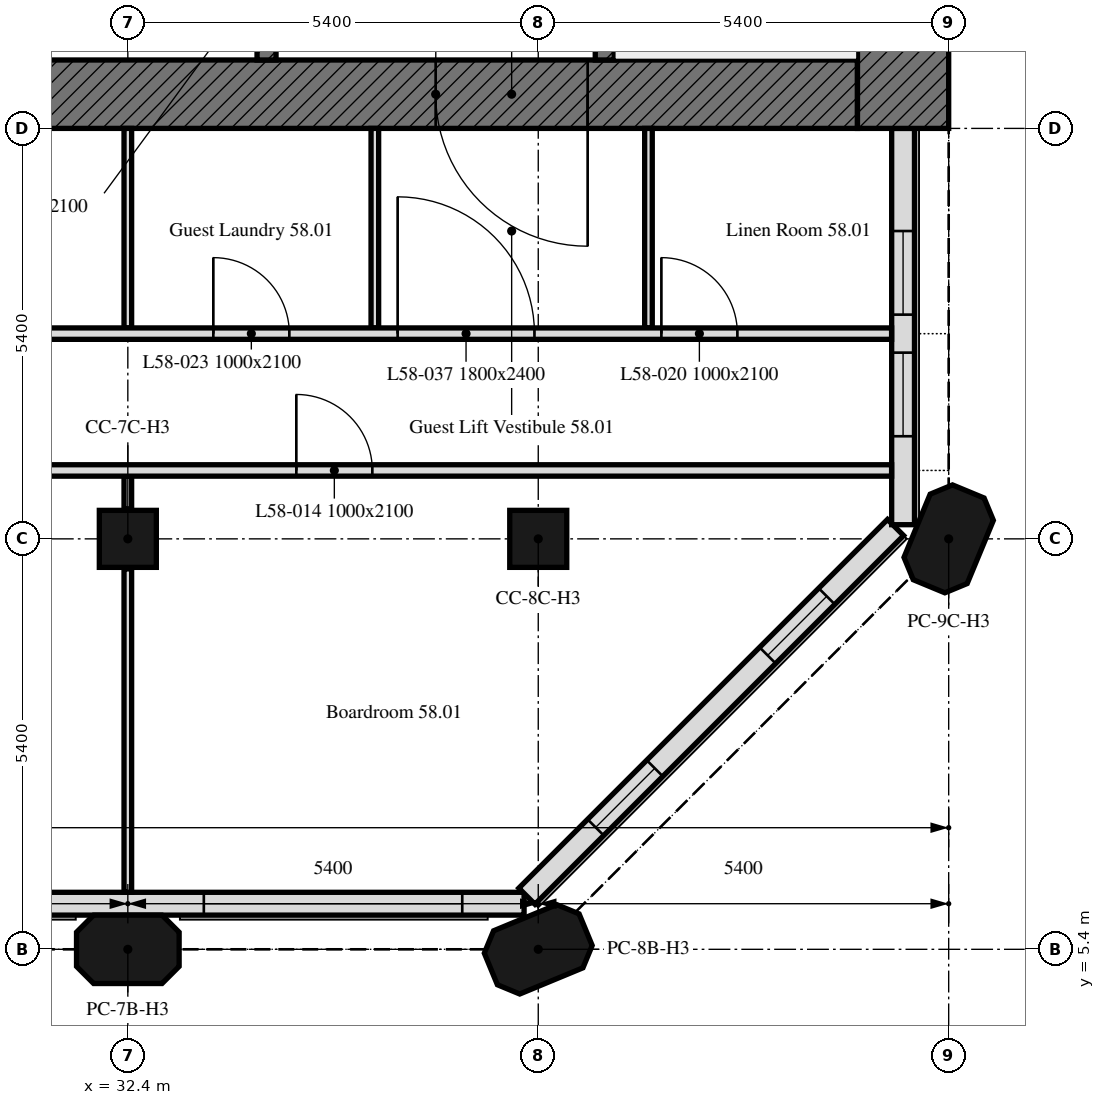
"""IFC4 building model, lengths in metres.
Left out: names, types, materials, properties, quantities, classifications, styles, units other than length and angle.
Written with IfcOpenShell. Run it as: python <this file> out.ifc"""

import sys

from ifc_helpers import new_model, si_unit, direction, frame, frame_2d, origin, origin_2d, place, context, subcontext, project, spatial, polyline, rectangle, outline, extrude, element, fill, save


model = new_model("IFC4")
c1 = context("Model", 3, precision=1e-05, world=origin(), true_north=direction((0.0, 1.0)))
c2 = subcontext(c1, "Body", "Model", "MODEL_VIEW")
j1 = project(units=[si_unit("LENGTHUNIT", "METRE"), si_unit("PLANEANGLEUNIT", "RADIAN")], contexts=[c1])
p1 = place(None, origin())
s1 = spatial("IfcSite", under=j1, at=p1, CompositionType="ELEMENT")
p2 = place(p1, origin())
s2 = spatial("IfcBuilding", under=s1, at=p2, CompositionType="ELEMENT")
p3 = place(p2, frame((0.0, 0.0, 230.2)))
s3 = spatial("IfcBuildingStorey", under=s2, at=p3, CompositionType="ELEMENT", Elevation=230.2)
for number, where, z_axis, x_axis in (
    (1, (32.4, 5.4, 0.0), (0.0, 0.0, 1.0), (1.0, 0.0, 0.0)),
    (2, (37.8, 5.4, 0.0), (0.0, 0.0, 1.0), (0.924, 0.383, 0.0)),
):
    element("IfcColumn", number, at=place(p3, frame(where, z_axis=z_axis, x_axis=x_axis)), inside=s3, PredefinedType="COLUMN", context=c2, shape_type="SweptSolid", body=[
        extrude(outline(polyline([(-0.45, -0.45), (0.45, -0.45), (0.675, -0.225), (0.675, 0.225), (0.45, 0.45), (-0.45, 0.45), (-0.675, 0.225), (-0.675, -0.225), (-0.45, -0.45)])), origin(), (0.0, 0.0, 1.0), 2.8),
    ])
for number, where, z_axis, x_axis in (
    (3, (32.4, 10.8, 0.0), (0.0, 0.0, 1.0), (1.0, 0.0, 0.0)),
    (4, (37.8, 10.8, 0.0), (0.0, 0.0, 1.0), (1.0, 0.0, 0.0)),
):
    element("IfcColumn", number, at=place(p3, frame(where, z_axis=z_axis, x_axis=x_axis)), inside=s3, PredefinedType="COLUMN", context=c2, shape_type="SweptSolid", body=[
        extrude(rectangle(XDim=0.75, YDim=0.75, at=origin_2d()), origin(), (0.0, 0.0, 1.0), 2.8),
    ])
p4 = place(p3, frame((43.2, 10.8, 0.0), z_axis=(0.0, 0.0, 1.0), x_axis=(0.382683432365, 0.923879532511, 0.0)))
e5 = element("IfcColumn", 5, at=p4, inside=s3, PredefinedType="COLUMN", context=c2, shape_type="SweptSolid", body=[
    extrude(outline(polyline([(-0.45, -0.45), (0.45, -0.45), (0.675, -0.225), (0.675, 0.225), (0.45, 0.45), (-0.45, 0.45), (-0.675, 0.225), (-0.675, -0.225), (-0.45, -0.45)])), origin(), (0.0, 0.0, 1.0), 2.8),
])
p5 = place(p3, frame((5.586, 6.0, 0.0), z_axis=(0.0, 0.0, 1.0), x_axis=(1.0, 0.0, 0.0)))
e6 = element("IfcWall", 6, at=p5, inside=s3, PredefinedType="SOLIDWALL", context=c2, shape_type="SweptSolid", body=[
    extrude(rectangle(XDim=32.027, YDim=0.3, at=frame_2d((16.014, 0.0))), origin(), (0.0, 0.0, 1.0), 2.8),
])
p6 = place(p5, frame((2.764, 0.0, 0.9)))
e7 = element("IfcOpeningElement", 7, at=p6, cuts=e6, PredefinedType="OPENING", context=c2, shape_type="SweptSolid", body=[
    extrude(rectangle(XDim=1.1, YDim=1.7, at=frame_2d((0.55, 0.85))), frame((0.0, 0.16, 0.0), z_axis=(0.0, -1.0, 0.0), x_axis=(1.0, 0.0, 0.0)), (0.0, 0.0, 1.0), 0.32),
])
p7 = place(p5, frame((6.214, 0.0, 0.9)))
e8 = element("IfcOpeningElement", 8, at=p7, cuts=e6, PredefinedType="OPENING", context=c2, shape_type="SweptSolid", body=[
    extrude(rectangle(XDim=3.4, YDim=1.7, at=frame_2d((1.7, 0.85))), frame((0.0, 0.16, 0.0), z_axis=(0.0, -1.0, 0.0), x_axis=(1.0, 0.0, 0.0)), (0.0, 0.0, 1.0), 0.32),
])
p8 = place(p5, frame((13.564, 0.0, 0.9)))
e9 = element("IfcOpeningElement", 9, at=p8, cuts=e6, PredefinedType="OPENING", context=c2, shape_type="SweptSolid", body=[
    extrude(rectangle(XDim=1.1, YDim=1.7, at=frame_2d((0.55, 0.85))), frame((0.0, 0.16, 0.0), z_axis=(0.0, -1.0, 0.0), x_axis=(1.0, 0.0, 0.0)), (0.0, 0.0, 1.0), 0.32),
])
p9 = place(p5, frame((17.014, 0.0, 0.9)))
e10 = element("IfcOpeningElement", 10, at=p9, cuts=e6, PredefinedType="OPENING", context=c2, shape_type="SweptSolid", body=[
    extrude(rectangle(XDim=3.4, YDim=1.7, at=frame_2d((1.7, 0.85))), frame((0.0, 0.16, 0.0), z_axis=(0.0, -1.0, 0.0), x_axis=(1.0, 0.0, 0.0)), (0.0, 0.0, 1.0), 0.32),
])
p10 = place(p5, frame((24.364, 0.0, 0.9)))
e11 = element("IfcOpeningElement", 11, at=p10, cuts=e6, PredefinedType="OPENING", context=c2, shape_type="SweptSolid", body=[
    extrude(rectangle(XDim=1.1, YDim=1.7, at=frame_2d((0.55, 0.85))), frame((0.0, 0.16, 0.0), z_axis=(0.0, -1.0, 0.0), x_axis=(1.0, 0.0, 0.0)), (0.0, 0.0, 1.0), 0.32),
])
p11 = place(p5, frame((27.814, 0.0, 0.9)))
e12 = element("IfcOpeningElement", 12, at=p11, cuts=e6, PredefinedType="OPENING", context=c2, shape_type="SweptSolid", body=[
    extrude(rectangle(XDim=3.4, YDim=1.7, at=frame_2d((1.7, 0.85))), frame((0.0, 0.16, 0.0), z_axis=(0.0, -1.0, 0.0), x_axis=(1.0, 0.0, 0.0)), (0.0, 0.0, 1.0), 0.32),
])
p12 = place(p3, frame((37.65, 6.099, 0.0), z_axis=(0.0, 0.0, 1.0), x_axis=(0.707106781187, 0.707106781187, 0.0)))
e13 = element("IfcWall", 13, at=p12, inside=s3, PredefinedType="SOLIDWALL", context=c2, shape_type="SweptSolid", body=[
    extrude(rectangle(XDim=6.86, YDim=0.3, at=frame_2d((3.43, 0.0))), origin(), (0.0, 0.0, 1.0), 2.8),
])
p13 = place(p12, frame((1.28, 0.0, 0.9)))
e14 = element("IfcOpeningElement", 14, at=p13, cuts=e13, PredefinedType="OPENING", context=c2, shape_type="SweptSolid", body=[
    extrude(rectangle(XDim=1.1, YDim=1.7, at=frame_2d((0.55, 0.85))), frame((0.0, 0.16, 0.0), z_axis=(0.0, -1.0, 0.0), x_axis=(1.0, 0.0, 0.0)), (0.0, 0.0, 1.0), 0.32),
])
p14 = place(p12, frame((4.48, 0.0, 0.9)))
e15 = element("IfcOpeningElement", 15, at=p14, cuts=e13, PredefinedType="OPENING", context=c2, shape_type="SweptSolid", body=[
    extrude(rectangle(XDim=1.1, YDim=1.7, at=frame_2d((0.55, 0.85))), frame((0.0, 0.16, 0.0), z_axis=(0.0, -1.0, 0.0), x_axis=(1.0, 0.0, 0.0)), (0.0, 0.0, 1.0), 0.32),
])
p15 = place(p3, frame((42.6, 10.986, 0.0), z_axis=(0.0, 0.0, 1.0), x_axis=(0.0, 1.0, 0.0)))
e16 = element("IfcWall", 16, at=p15, inside=s3, PredefinedType="SOLIDWALL", context=c2, shape_type="SweptSolid", body=[
    extrude(rectangle(XDim=5.214, YDim=0.3, at=frame_2d((2.607, 0.0))), origin(), (0.0, 0.0, 1.0), 2.8),
])
p16 = place(p15, frame((1.164, 0.0, 0.9)))
e17 = element("IfcOpeningElement", 17, at=p16, cuts=e16, PredefinedType="OPENING", context=c2, shape_type="SweptSolid", body=[
    extrude(rectangle(XDim=1.1, YDim=1.7, at=frame_2d((0.55, 0.85))), frame((0.0, 0.16, 0.0), z_axis=(0.0, -1.0, 0.0), x_axis=(1.0, 0.0, 0.0)), (0.0, 0.0, 1.0), 0.32),
])
p17 = place(p15, frame((2.764, 0.0, 0.9)))
e18 = element("IfcOpeningElement", 18, at=p17, cuts=e16, PredefinedType="OPENING", context=c2, shape_type="SweptSolid", body=[
    extrude(rectangle(XDim=1.1, YDim=1.7, at=frame_2d((0.55, 0.85))), frame((0.0, 0.16, 0.0), z_axis=(0.0, -1.0, 0.0), x_axis=(1.0, 0.0, 0.0)), (0.0, 0.0, 1.0), 0.32),
])
p18 = place(p3, frame((42.0, 16.65, 0.0), z_axis=(0.0, 0.0, 1.0), x_axis=(-1.0, 0.0, 0.0)))
e19 = element("IfcWall", 19, at=p18, inside=s3, PredefinedType="SOLIDWALL", context=c2, shape_type="SweptSolid", body=[
    extrude(rectangle(XDim=11.1, YDim=0.9, at=frame_2d((5.55, 0.0))), origin(), (0.0, 0.0, 1.0), 2.8),
])
p19 = place(p18, frame((3.55, 0.0, 0.0)))
e20 = element("IfcOpeningElement", 20, at=p19, cuts=e19, PredefinedType="OPENING", context=c2, shape_type="SweptSolid", body=[
    extrude(rectangle(XDim=2.0, YDim=2.4, at=frame_2d((1.0, 1.2))), frame((0.0, 0.45, 0.0), z_axis=(0.0, -1.0, 0.0), x_axis=(1.0, 0.0, 0.0)), (0.0, 0.0, 1.0), 0.9),
])
p20 = place(p3, frame((42.6, 32.4, 0.0), z_axis=(0.0, 0.0, 1.0), x_axis=(0.0, -1.0, 0.0)))
e21 = element("IfcWall", 21, at=p20, inside=s3, PredefinedType="SOLIDWALL", context=c2, shape_type="SweptSolid", body=[
    extrude(rectangle(XDim=16.2, YDim=1.2, at=frame_2d((8.1, 0.0))), origin(), (0.0, 0.0, 1.0), 2.8),
])
p21 = place(p3, frame((38.675, 17.1, 0.0), z_axis=(0.0, 0.0, 1.0), x_axis=(0.0, 1.0, 0.0)))
e22 = element("IfcWall", 22, at=p21, inside=s3, PredefinedType="SOLIDWALL", context=c2, shape_type="SweptSolid", body=[
    extrude(rectangle(XDim=14.4, YDim=0.25, at=frame_2d((7.2, 0.0))), origin(), (0.0, 0.0, 1.0), 2.8),
])
p22 = place(p21, frame((4.6, 0.0, 0.0)))
e23 = element("IfcOpeningElement", 23, at=p22, cuts=e22, PredefinedType="OPENING", context=c2, shape_type="SweptSolid", body=[
    extrude(rectangle(XDim=1.0, YDim=2.1, at=frame_2d((0.5, 1.05))), frame((0.0, 0.125, 0.0), z_axis=(0.0, -1.0, 0.0), x_axis=(1.0, 0.0, 0.0)), (0.0, 0.0, 1.0), 0.25),
])
p23 = place(p21, frame((7.062, 0.0, 0.0)))
e24 = element("IfcOpeningElement", 24, at=p23, cuts=e22, PredefinedType="OPENING", context=c2, shape_type="SweptSolid", body=[
    extrude(rectangle(XDim=1.2, YDim=2.1, at=frame_2d((0.6, 1.05))), frame((0.0, 0.125, 0.0), z_axis=(0.0, -1.0, 0.0), x_axis=(1.0, 0.0, 0.0)), (0.0, 0.0, 1.0), 0.25),
])
p24 = place(p21, frame((9.726, 0.0, 0.0)))
e25 = element("IfcOpeningElement", 25, at=p24, cuts=e22, PredefinedType="OPENING", context=c2, shape_type="SweptSolid", body=[
    extrude(rectangle(XDim=0.9, YDim=2.1, at=frame_2d((0.45, 1.05))), frame((0.0, 0.125, 0.0), z_axis=(0.0, -1.0, 0.0), x_axis=(1.0, 0.0, 0.0)), (0.0, 0.0, 1.0), 0.25),
])
p25 = place(p21, frame((11.539, 0.0, 0.0)))
e26 = element("IfcOpeningElement", 26, at=p25, cuts=e22, PredefinedType="OPENING", context=c2, shape_type="SweptSolid", body=[
    extrude(rectangle(XDim=0.9, YDim=2.1, at=frame_2d((0.45, 1.05))), frame((0.0, 0.125, 0.0), z_axis=(0.0, -1.0, 0.0), x_axis=(1.0, 0.0, 0.0)), (0.0, 0.0, 1.0), 0.25),
])
p26 = place(p21, frame((13.226, 0.0, 0.0)))
e27 = element("IfcOpeningElement", 27, at=p26, cuts=e22, PredefinedType="OPENING", context=c2, shape_type="SweptSolid", body=[
    extrude(rectangle(XDim=0.9, YDim=2.1, at=frame_2d((0.45, 1.05))), frame((0.0, 0.125, 0.0), z_axis=(0.0, -1.0, 0.0), x_axis=(1.0, 0.0, 0.0)), (0.0, 0.0, 1.0), 0.25),
])
p27 = place(p3, frame((34.225, 17.1, 0.0), z_axis=(0.0, 0.0, 1.0), x_axis=(0.0, 1.0, 0.0)))
e28 = element("IfcWall", 28, at=p27, inside=s3, PredefinedType="SOLIDWALL", context=c2, shape_type="SweptSolid", body=[
    extrude(rectangle(XDim=14.4, YDim=0.25, at=frame_2d((7.2, 0.0))), origin(), (0.0, 0.0, 1.0), 2.8),
])
p28 = place(p27, frame((13.15, 0.0, 0.0)))
e29 = element("IfcOpeningElement", 29, at=p28, cuts=e28, PredefinedType="OPENING", context=c2, shape_type="SweptSolid", body=[
    extrude(rectangle(XDim=1.0, YDim=2.1, at=frame_2d((0.5, 1.05))), frame((0.0, 0.125, 0.0), z_axis=(0.0, -1.0, 0.0), x_axis=(1.0, 0.0, 0.0)), (0.0, 0.0, 1.0), 0.25),
])
p29 = place(p27, frame((0.6, 0.0, 0.0)))
e30 = element("IfcOpeningElement", 30, at=p29, cuts=e28, PredefinedType="OPENING", context=c2, shape_type="SweptSolid", body=[
    extrude(rectangle(XDim=1.1, YDim=2.1, at=frame_2d((0.55, 1.05))), frame((0.0, 0.125, 0.0), z_axis=(0.0, -1.0, 0.0), x_axis=(1.0, 0.0, 0.0)), (0.0, 0.0, 1.0), 0.25),
])
p30 = place(p27, frame((3.25, 0.0, 0.0)))
e31 = element("IfcOpeningElement", 31, at=p30, cuts=e28, PredefinedType="OPENING", context=c2, shape_type="SweptSolid", body=[
    extrude(rectangle(XDim=0.9, YDim=2.1, at=frame_2d((0.45, 1.05))), frame((0.0, 0.125, 0.0), z_axis=(0.0, -1.0, 0.0), x_axis=(1.0, 0.0, 0.0)), (0.0, 0.0, 1.0), 0.25),
])
p31 = place(p3, frame((32.4, 11.625, 0.0), z_axis=(0.0, 0.0, 1.0), x_axis=(0.0, -1.0, 0.0)))
e32 = element("IfcWall", 32, at=p31, inside=s3, PredefinedType="PARTITIONING", context=c2, shape_type="SweptSolid", body=[
    extrude(rectangle(XDim=0.43, YDim=0.1, at=frame_2d((0.215, 0.0))), origin(), (0.0, 0.0, 1.0), 2.2),
])
p32 = place(p3, frame((32.4, 10.405, 0.0), z_axis=(0.0, 0.0, 1.0), x_axis=(0.0, -1.0, 0.0)))
e33 = element("IfcWall", 33, at=p32, inside=s3, PredefinedType="PARTITIONING", context=c2, shape_type="SweptSolid", body=[
    extrude(rectangle(XDim=4.254, YDim=0.1, at=frame_2d((2.127, 0.0))), origin(), (0.0, 0.0, 1.0), 2.2),
])
p33 = place(p3, frame((0.751, 11.7, 0.0), z_axis=(0.0, 0.0, 1.0), x_axis=(1.0, 0.0, 0.0)))
e34 = element("IfcWall", 34, at=p33, inside=s3, PredefinedType="PARTITIONING", context=c2, shape_type="SweptSolid", body=[
    extrude(rectangle(XDim=41.698, YDim=0.15, at=frame_2d((20.849, 0.0))), origin(), (0.0, 0.0, 1.0), 2.2),
])
p34 = place(p33, frame((33.866, 0.0, 0.0)))
e35 = element("IfcOpeningElement", 35, at=p34, cuts=e34, PredefinedType="OPENING", context=c2, shape_type="SweptSolid", body=[
    extrude(rectangle(XDim=1.0, YDim=2.1, at=frame_2d((0.5, 1.05))), frame((0.0, 0.075, 0.0), z_axis=(0.0, -1.0, 0.0), x_axis=(1.0, 0.0, 0.0)), (0.0, 0.0, 1.0), 0.15),
])
p35 = place(p33, frame((28.432, 0.0, 0.0)))
e36 = element("IfcOpeningElement", 36, at=p35, cuts=e34, PredefinedType="OPENING", context=c2, shape_type="SweptSolid", body=[
    extrude(rectangle(XDim=1.0, YDim=2.1, at=frame_2d((0.5, 1.05))), frame((0.0, 0.075, 0.0), z_axis=(0.0, -1.0, 0.0), x_axis=(1.0, 0.0, 0.0)), (0.0, 0.0, 1.0), 0.15),
])
p36 = place(p33, frame((12.266, 0.0, 0.0)))
e37 = element("IfcOpeningElement", 37, at=p36, cuts=e34, PredefinedType="OPENING", context=c2, shape_type="SweptSolid", body=[
    extrude(rectangle(XDim=1.0, YDim=2.1, at=frame_2d((0.5, 1.05))), frame((0.0, 0.075, 0.0), z_axis=(0.0, -1.0, 0.0), x_axis=(1.0, 0.0, 0.0)), (0.0, 0.0, 1.0), 0.15),
])
p37 = place(p33, frame((2.744, 0.0, 0.0)))
e38 = element("IfcOpeningElement", 38, at=p37, cuts=e34, PredefinedType="OPENING", context=c2, shape_type="SweptSolid", body=[
    extrude(rectangle(XDim=1.0, YDim=2.1, at=frame_2d((0.5, 1.05))), frame((0.0, 0.075, 0.0), z_axis=(0.0, -1.0, 0.0), x_axis=(1.0, 0.0, 0.0)), (0.0, 0.0, 1.0), 0.15),
])
p38 = place(p3, frame((32.4, 13.575, 0.0), z_axis=(0.0, 0.0, 1.0), x_axis=(0.0, 1.0, 0.0)))
e39 = element("IfcWall", 39, at=p38, inside=s3, PredefinedType="PARTITIONING", context=c2, shape_type="SweptSolid", body=[
    extrude(rectangle(XDim=2.625, YDim=0.1, at=frame_2d((1.312, 0.0))), origin(), (0.0, 0.0, 1.0), 2.2),
])
for number, where, z_axis, x_axis in (
    (40, (39.25, 13.575, 0.0), (0.0, 0.0, 1.0), (0.0, 1.0, 0.0)),
    (41, (35.65, 16.2, 0.0), (0.0, 0.0, 1.0), (0.0, -1.0, 0.0)),
):
    element("IfcWall", number, at=place(p3, frame(where, z_axis=z_axis, x_axis=x_axis)), inside=s3, PredefinedType="PARTITIONING", context=c2, shape_type="SweptSolid", body=[
        extrude(rectangle(XDim=2.625, YDim=0.1, at=frame_2d((1.312, 0.0))), origin(), (0.0, 0.0, 1.0), 2.8),
    ])
p39 = place(p3, frame((5.325, 13.5, 0.0), z_axis=(0.0, 0.0, 1.0), x_axis=(1.0, 0.0, 0.0)))
e42 = element("IfcWall", 42, at=p39, inside=s3, PredefinedType="PARTITIONING", context=c2, shape_type="SweptSolid", body=[
    extrude(rectangle(XDim=37.124, YDim=0.15, at=frame_2d((18.562, 0.0))), origin(), (0.0, 0.0, 1.0), 2.2),
])
p40 = place(p39, frame((18.475, 0.0, 0.0)))
e43 = element("IfcOpeningElement", 43, at=p40, cuts=e42, PredefinedType="OPENING", context=c2, shape_type="SweptSolid", body=[
    extrude(rectangle(XDim=1.0, YDim=2.1, at=frame_2d((0.5, 1.05))), frame((0.0, 0.075, 0.0), z_axis=(0.0, -1.0, 0.0), x_axis=(1.0, 0.0, 0.0)), (0.0, 0.0, 1.0), 0.15),
])
p41 = place(p39, frame((34.095, 0.0, 0.0)))
e44 = element("IfcOpeningElement", 44, at=p41, cuts=e42, PredefinedType="OPENING", context=c2, shape_type="SweptSolid", body=[
    extrude(rectangle(XDim=1.0, YDim=2.1, at=frame_2d((0.5, 1.05))), frame((0.0, 0.075, 0.0), z_axis=(0.0, -1.0, 0.0), x_axis=(1.0, 0.0, 0.0)), (0.0, 0.0, 1.0), 0.15),
])
p42 = place(p39, frame((8.75, 0.0, 0.0)))
e45 = element("IfcOpeningElement", 45, at=p42, cuts=e42, PredefinedType="OPENING", context=c2, shape_type="SweptSolid", body=[
    extrude(rectangle(XDim=1.0, YDim=2.1, at=frame_2d((0.5, 1.05))), frame((0.0, 0.075, 0.0), z_axis=(0.0, -1.0, 0.0), x_axis=(1.0, 0.0, 0.0)), (0.0, 0.0, 1.0), 0.15),
])
p43 = place(p39, frame((1.55, 0.0, 0.0)))
e46 = element("IfcOpeningElement", 46, at=p43, cuts=e42, PredefinedType="OPENING", context=c2, shape_type="SweptSolid", body=[
    extrude(rectangle(XDim=1.0, YDim=2.1, at=frame_2d((0.5, 1.05))), frame((0.0, 0.075, 0.0), z_axis=(0.0, -1.0, 0.0), x_axis=(1.0, 0.0, 0.0)), (0.0, 0.0, 1.0), 0.15),
])
p44 = place(p39, frame((28.2, 0.0, 0.0)))
e47 = element("IfcOpeningElement", 47, at=p44, cuts=e42, PredefinedType="OPENING", context=c2, shape_type="SweptSolid", body=[
    extrude(rectangle(XDim=1.0, YDim=2.1, at=frame_2d((0.5, 1.05))), frame((0.0, 0.075, 0.0), z_axis=(0.0, -1.0, 0.0), x_axis=(1.0, 0.0, 0.0)), (0.0, 0.0, 1.0), 0.15),
])
p45 = place(p39, frame((30.625, 0.0, 0.0)))
e48 = element("IfcOpeningElement", 48, at=p45, cuts=e42, PredefinedType="OPENING", context=c2, shape_type="SweptSolid", body=[
    extrude(rectangle(XDim=1.8, YDim=2.4, at=frame_2d((0.9, 1.2))), frame((0.0, 0.075, 0.0), z_axis=(0.0, -1.0, 0.0), x_axis=(1.0, 0.0, 0.0)), (0.0, 0.0, 1.0), 0.15),
])
p46 = place(p39, frame((5.925, 0.0, 0.0)))
e49 = element("IfcOpeningElement", 49, at=p46, cuts=e42, PredefinedType="OPENING", context=c2, shape_type="SweptSolid", body=[
    extrude(rectangle(XDim=1.0, YDim=2.1, at=frame_2d((0.5, 1.05))), frame((0.0, 0.075, 0.0), z_axis=(0.0, -1.0, 0.0), x_axis=(1.0, 0.0, 0.0)), (0.0, 0.0, 1.0), 0.15),
])
p47 = place(p11, origin())
e50 = element("IfcWindow", 50, at=p47, inside=s3, PartitioningType="SINGLE_PANEL", PredefinedType="WINDOW", context=c2, shape_type="SweptSolid", body=[
    extrude(rectangle(XDim=3.4, YDim=1.7, at=frame_2d((1.7, 0.85))), frame((0.0, 0.03, 0.0), z_axis=(0.0, -1.0, 0.0), x_axis=(1.0, 0.0, 0.0)), (0.0, 0.0, 1.0), 0.06),
])
fill(e12, e50)
p48 = place(p13, origin())
e51 = element("IfcWindow", 51, at=p48, inside=s3, PartitioningType="SINGLE_PANEL", PredefinedType="WINDOW", context=c2, shape_type="SweptSolid", body=[
    extrude(rectangle(XDim=1.1, YDim=1.7, at=frame_2d((0.55, 0.85))), frame((0.0, 0.03, 0.0), z_axis=(0.0, -1.0, 0.0), x_axis=(1.0, 0.0, 0.0)), (0.0, 0.0, 1.0), 0.06),
])
fill(e14, e51)
p49 = place(p14, origin())
e52 = element("IfcWindow", 52, at=p49, inside=s3, PartitioningType="SINGLE_PANEL", PredefinedType="WINDOW", context=c2, shape_type="SweptSolid", body=[
    extrude(rectangle(XDim=1.1, YDim=1.7, at=frame_2d((0.55, 0.85))), frame((0.0, 0.03, 0.0), z_axis=(0.0, -1.0, 0.0), x_axis=(1.0, 0.0, 0.0)), (0.0, 0.0, 1.0), 0.06),
])
fill(e15, e52)
p50 = place(p16, origin())
e53 = element("IfcWindow", 53, at=p50, inside=s3, PartitioningType="SINGLE_PANEL", PredefinedType="WINDOW", context=c2, shape_type="SweptSolid", body=[
    extrude(rectangle(XDim=1.1, YDim=1.7, at=frame_2d((0.55, 0.85))), frame((0.0, 0.03, 0.0), z_axis=(0.0, -1.0, 0.0), x_axis=(1.0, 0.0, 0.0)), (0.0, 0.0, 1.0), 0.06),
])
fill(e17, e53)
p51 = place(p17, origin())
e54 = element("IfcWindow", 54, at=p51, inside=s3, PartitioningType="SINGLE_PANEL", PredefinedType="WINDOW", context=c2, shape_type="SweptSolid", body=[
    extrude(rectangle(XDim=1.1, YDim=1.7, at=frame_2d((0.55, 0.85))), frame((0.0, 0.03, 0.0), z_axis=(0.0, -1.0, 0.0), x_axis=(1.0, 0.0, 0.0)), (0.0, 0.0, 1.0), 0.06),
])
fill(e18, e54)
p52 = place(p19, origin())
e55 = element("IfcDoor", 55, at=p52, inside=s3, OperationType="DOUBLE_DOOR_SINGLE_SWING", PredefinedType="DOOR", context=c2, shape_type="SweptSolid", body=[
    extrude(rectangle(XDim=2.0, YDim=2.4, at=frame_2d((1.0, 1.2))), frame((0.0, 0.025, 0.0), z_axis=(0.0, -1.0, 0.0), x_axis=(1.0, 0.0, 0.0)), (0.0, 0.0, 1.0), 0.05),
])
fill(e20, e55)
p53 = place(p34, origin())
e56 = element("IfcDoor", 56, at=p53, inside=s3, OperationType="SINGLE_SWING_RIGHT", PredefinedType="DOOR", context=c2, shape_type="SweptSolid", body=[
    extrude(rectangle(XDim=1.0, YDim=2.1, at=frame_2d((0.5, 1.05))), frame((0.0, 0.025, 0.0), z_axis=(0.0, -1.0, 0.0), x_axis=(1.0, 0.0, 0.0)), (0.0, 0.0, 1.0), 0.05),
])
fill(e35, e56)
p54 = place(p41, origin())
e57 = element("IfcDoor", 57, at=p54, inside=s3, OperationType="SINGLE_SWING_LEFT", PredefinedType="DOOR", context=c2, shape_type="SweptSolid", body=[
    extrude(rectangle(XDim=1.0, YDim=2.1, at=frame_2d((0.5, 1.05))), frame((0.0, 0.025, 0.0), z_axis=(0.0, -1.0, 0.0), x_axis=(1.0, 0.0, 0.0)), (0.0, 0.0, 1.0), 0.05),
])
fill(e44, e57)
p55 = place(p44, origin())
e58 = element("IfcDoor", 58, at=p55, inside=s3, OperationType="SINGLE_SWING_RIGHT", PredefinedType="DOOR", context=c2, shape_type="SweptSolid", body=[
    extrude(rectangle(XDim=1.0, YDim=2.1, at=frame_2d((0.5, 1.05))), frame((0.0, 0.025, 0.0), z_axis=(0.0, -1.0, 0.0), x_axis=(1.0, 0.0, 0.0)), (0.0, 0.0, 1.0), 0.05),
])
fill(e47, e58)
p56 = place(p45, origin())
e59 = element("IfcDoor", 59, at=p56, inside=s3, OperationType="DOUBLE_DOOR_SINGLE_SWING", PredefinedType="DOOR", context=c2, shape_type="SweptSolid", body=[
    extrude(rectangle(XDim=1.8, YDim=2.4, at=frame_2d((0.9, 1.2))), frame((0.0, 0.025, 0.0), z_axis=(0.0, -1.0, 0.0), x_axis=(1.0, 0.0, 0.0)), (0.0, 0.0, 1.0), 0.05),
])
fill(e48, e59)
save(model, sys.argv[1])
